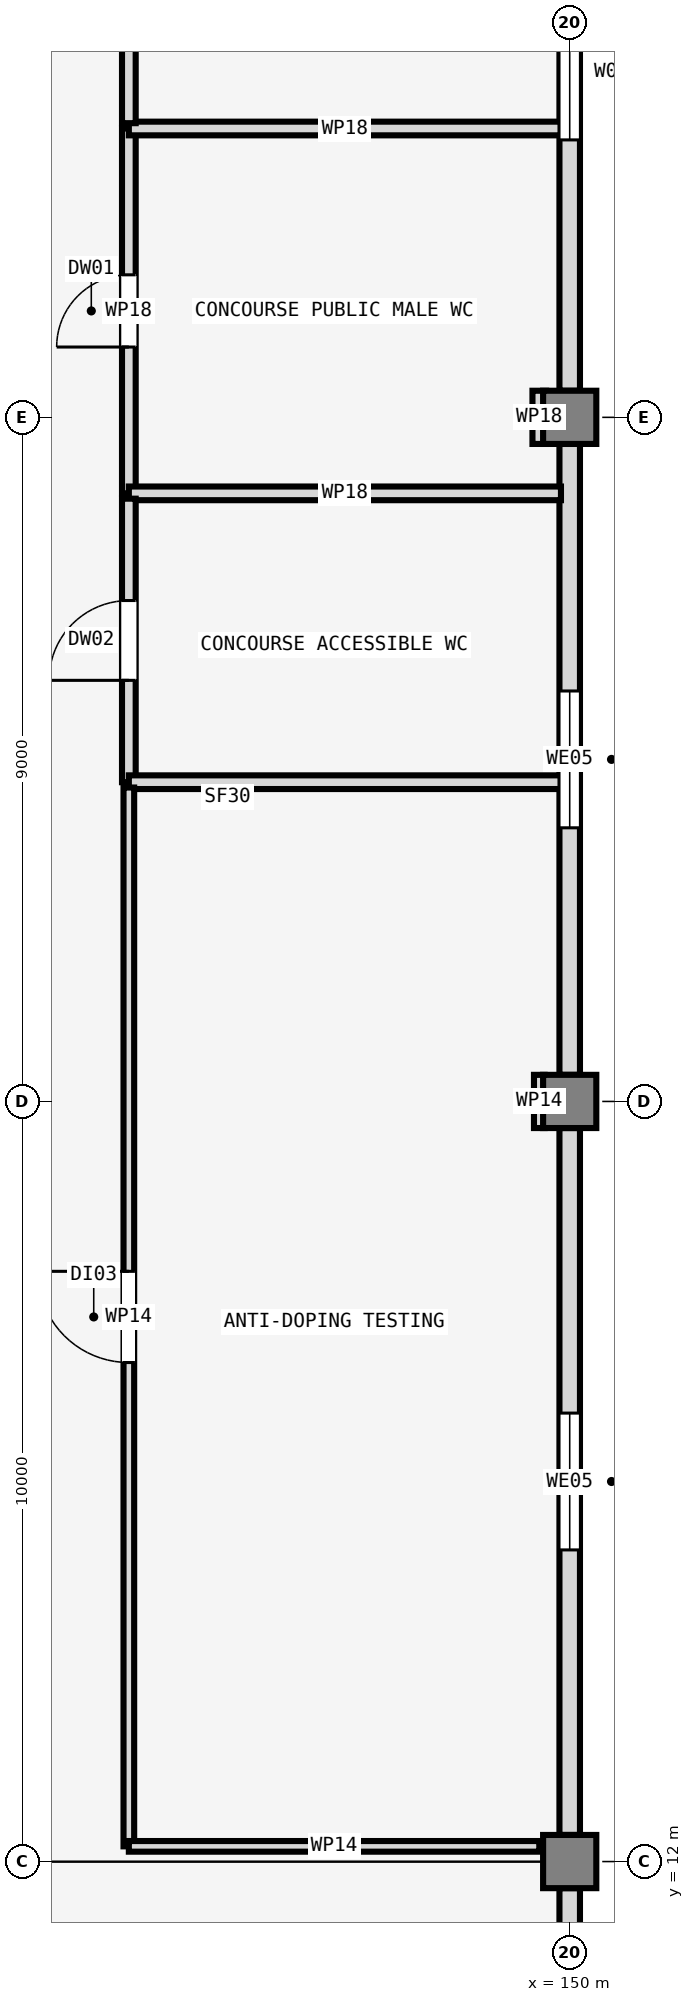
"""IFC4 building model, lengths in metres.
Left out: names, types, materials, properties, quantities, classifications, styles, units other than length and angle.
Written with IfcOpenShell. Run it as: python <this file> out.ifc"""

import sys

from ifc_helpers import new_model, si_unit, direction, frame, frame_2d, origin, origin_2d, place, context, subcontext, project, spatial, rectangle, extrude, element, fill, save


model = new_model("IFC4")
c1 = context("Model", 3, precision=1e-05, world=origin(), true_north=direction((0.0, 1.0)))
c2 = subcontext(c1, "Body", "Model", "MODEL_VIEW")
j1 = project(units=[si_unit("LENGTHUNIT", "METRE"), si_unit("PLANEANGLEUNIT", "RADIAN")], contexts=[c1])
p1 = place(None, origin())
s1 = spatial("IfcSite", under=j1, at=p1, CompositionType="ELEMENT")
p2 = place(p1, origin())
s2 = spatial("IfcBuilding", under=s1, at=p2, CompositionType="ELEMENT")
p3 = place(p2, origin())
s3 = spatial("IfcBuildingStorey", under=s2, at=p3, CompositionType="ELEMENT", Elevation=0.0)
for number, where, z_axis, x_axis in (
    (1, (150.0, 12.0, 0.0), (0.0, 0.0, 1.0), (1.0, 0.0, 0.0)),
    (2, (150.0, 22.0, 0.0), (0.0, 0.0, 1.0), (1.0, 0.0, 0.0)),
    (3, (150.0, 31.0, 0.0), (0.0, 0.0, 1.0), (1.0, 0.0, 0.0)),
):
    element("IfcColumn", number, at=place(p3, frame(where, z_axis=z_axis, x_axis=x_axis)), inside=s3, PredefinedType="COLUMN", context=c2, shape_type="SweptSolid", body=[
        extrude(rectangle(XDim=0.7, YDim=0.7, at=origin_2d()), origin(), (0.0, 0.0, 1.0), 4.8),
    ])
p4 = place(p3, frame((150.0, 6.35, 0.0), z_axis=(0.0, 0.0, 1.0), x_axis=(0.0, 1.0, 0.0)))
e4 = element("IfcWall", 4, at=p4, inside=s3, PredefinedType="SOLIDWALL", context=c2, shape_type="SweptSolid", body=[
    extrude(rectangle(XDim=5.3, YDim=0.27, at=frame_2d((2.65, 0.0))), origin(), (0.0, 0.0, 1.0), 3.73),
])
p5 = place(p4, frame((2.0, 0.0, 1.95)))
e5 = element("IfcOpeningElement", 5, at=p5, cuts=e4, PredefinedType="OPENING", context=c2, shape_type="SweptSolid", body=[
    extrude(rectangle(XDim=1.3, YDim=0.85, at=frame_2d((0.65, 0.425))), frame((0.0, 0.145, 0.0), z_axis=(0.0, -1.0, 0.0), x_axis=(1.0, 0.0, 0.0)), (0.0, 0.0, 1.0), 0.29),
])
p6 = place(p3, frame((150.0, 12.35, 0.0), z_axis=(0.0, 0.0, 1.0), x_axis=(0.0, 1.0, 0.0)))
e6 = element("IfcWall", 6, at=p6, inside=s3, PredefinedType="SOLIDWALL", context=c2, shape_type="SweptSolid", body=[
    extrude(rectangle(XDim=9.3, YDim=0.27, at=frame_2d((4.65, 0.0))), origin(), (0.0, 0.0, 1.0), 3.73),
])
p7 = place(p6, frame((3.75, 0.0, 1.2)))
e7 = element("IfcOpeningElement", 7, at=p7, cuts=e6, PredefinedType="OPENING", context=c2, shape_type="SweptSolid", body=[
    extrude(rectangle(XDim=1.8, YDim=1.5, at=frame_2d((0.9, 0.75))), frame((0.0, 0.145, 0.0), z_axis=(0.0, -1.0, 0.0), x_axis=(1.0, 0.0, 0.0)), (0.0, 0.0, 1.0), 0.29),
])
p8 = place(p3, frame((150.0, 22.35, 0.0), z_axis=(0.0, 0.0, 1.0), x_axis=(0.0, 1.0, 0.0)))
e8 = element("IfcWall", 8, at=p8, inside=s3, PredefinedType="SOLIDWALL", context=c2, shape_type="SweptSolid", body=[
    extrude(rectangle(XDim=8.3, YDim=0.27, at=frame_2d((4.15, 0.0))), origin(), (0.0, 0.0, 1.0), 3.73),
])
p9 = place(p8, frame((3.25, 0.0, 1.2)))
e9 = element("IfcOpeningElement", 9, at=p9, cuts=e8, PredefinedType="OPENING", context=c2, shape_type="SweptSolid", body=[
    extrude(rectangle(XDim=1.8, YDim=1.5, at=frame_2d((0.9, 0.75))), frame((0.0, 0.145, 0.0), z_axis=(0.0, -1.0, 0.0), x_axis=(1.0, 0.0, 0.0)), (0.0, 0.0, 1.0), 0.29),
])
p10 = place(p3, frame((150.0, 31.35, 0.0), z_axis=(0.0, 0.0, 1.0), x_axis=(0.0, 1.0, 0.0)))
e10 = element("IfcWall", 10, at=p10, inside=s3, PredefinedType="SOLIDWALL", context=c2, shape_type="SweptSolid", body=[
    extrude(rectangle(XDim=8.4, YDim=0.27, at=frame_2d((4.2, 0.0))), origin(), (0.0, 0.0, 1.0), 3.73),
])
p11 = place(p10, frame((3.3, 0.0, 1.2)))
e11 = element("IfcOpeningElement", 11, at=p11, cuts=e10, PredefinedType="OPENING", context=c2, shape_type="SweptSolid", body=[
    extrude(rectangle(XDim=1.8, YDim=1.5, at=frame_2d((0.9, 0.75))), frame((0.0, 0.145, 0.0), z_axis=(0.0, -1.0, 0.0), x_axis=(1.0, 0.0, 0.0)), (0.0, 0.0, 1.0), 0.29),
])
p12 = place(p3, frame((144.2, 30.0, 0.0), z_axis=(0.0, 0.0, 1.0), x_axis=(0.0, 1.0, 0.0)))
e12 = element("IfcWall", 12, at=p12, inside=s3, PredefinedType="PARTITIONING", context=c2, shape_type="SweptSolid", body=[
    extrude(rectangle(XDim=4.8, YDim=0.18, at=frame_2d((2.4, 0.0))), origin(), (0.0, 0.0, 1.0), 3.68),
])
p13 = place(p12, frame((1.925, 0.0, 0.0)))
e13 = element("IfcOpeningElement", 13, at=p13, cuts=e12, PredefinedType="OPENING", context=c2, shape_type="SweptSolid", body=[
    extrude(rectangle(XDim=0.95, YDim=2.1, at=frame_2d((0.475, 1.05))), frame((0.0, 0.1, 0.0), z_axis=(0.0, -1.0, 0.0), x_axis=(1.0, 0.0, 0.0)), (0.0, 0.0, 1.0), 0.2),
])
for number, where, z_axis, x_axis in (
    (14, (144.2, 34.8, 0.0), (0.0, 0.0, 1.0), (1.0, 0.0, 0.0)),
    (15, (149.885, 30.0, 0.0), (0.0, 0.0, 1.0), (-1.0, 0.0, 0.0)),
):
    element("IfcWall", number, at=place(p3, frame(where, z_axis=z_axis, x_axis=x_axis)), inside=s3, PredefinedType="PARTITIONING", context=c2, shape_type="SweptSolid", body=[
        extrude(rectangle(XDim=5.685, YDim=0.18, at=frame_2d((2.843, 0.0))), origin(), (0.0, 0.0, 1.0), 3.68),
    ])
p14 = place(p3, frame((149.6, 31.35, 0.0), z_axis=(0.0, 0.0, 1.0), x_axis=(0.0, -1.0, 0.0)))
e16 = element("IfcWall", 16, at=p14, inside=s3, PredefinedType="PARTITIONING", context=c2, shape_type="SweptSolid", body=[
    extrude(rectangle(XDim=0.7, YDim=0.18, at=frame_2d((0.35, 0.0))), origin(), (0.0, 0.0, 1.0), 3.68),
])
p15 = place(p3, frame((144.2, 34.87, 0.0), z_axis=(0.0, 0.0, 1.0), x_axis=(0.0, 1.0, 0.0)))
e17 = element("IfcWall", 17, at=p15, inside=s3, PredefinedType="PARTITIONING", context=c2, shape_type="SweptSolid", body=[
    extrude(rectangle(XDim=5.059, YDim=0.18, at=frame_2d((2.529, 0.0))), origin(), (0.0, 0.0, 1.0), 3.68),
])
p16 = place(p15, frame((2.054, 0.0, 0.0)))
e18 = element("IfcOpeningElement", 18, at=p16, cuts=e17, PredefinedType="OPENING", context=c2, shape_type="SweptSolid", body=[
    extrude(rectangle(XDim=0.95, YDim=2.1, at=frame_2d((0.475, 1.05))), frame((0.0, 0.1, 0.0), z_axis=(0.0, -1.0, 0.0), x_axis=(1.0, 0.0, 0.0)), (0.0, 0.0, 1.0), 0.2),
])
p17 = place(p3, frame((144.2, 26.2, 0.0), z_axis=(0.0, 0.0, 1.0), x_axis=(0.0, 1.0, 0.0)))
e19 = element("IfcWall", 19, at=p17, inside=s3, PredefinedType="PARTITIONING", context=c2, shape_type="SweptSolid", body=[
    extrude(rectangle(XDim=3.73, YDim=0.18, at=frame_2d((1.865, 0.0))), origin(), (0.0, 0.0, 1.0), 3.68),
])
p18 = place(p17, frame((1.34, 0.0, 0.0)))
e20 = element("IfcOpeningElement", 20, at=p18, cuts=e19, PredefinedType="OPENING", context=c2, shape_type="SweptSolid", body=[
    extrude(rectangle(XDim=1.05, YDim=2.1, at=frame_2d((0.525, 1.05))), frame((0.0, 0.1, 0.0), z_axis=(0.0, -1.0, 0.0), x_axis=(1.0, 0.0, 0.0)), (0.0, 0.0, 1.0), 0.2),
])
p19 = place(p3, frame((149.885, 26.2, 0.0), z_axis=(0.0, 0.0, 1.0), x_axis=(-1.0, 0.0, 0.0)))
e21 = element("IfcWall", 21, at=p19, inside=s3, PredefinedType="PARTITIONING", context=c2, shape_type="SweptSolid", body=[
    extrude(rectangle(XDim=5.685, YDim=0.18, at=frame_2d((2.843, 0.0))), origin(), (0.0, 0.0, 1.0), 3.68),
])
p20 = place(p3, frame((144.2, 12.2, 0.0), z_axis=(0.0, 0.0, 1.0), x_axis=(0.0, 1.0, 0.0)))
e22 = element("IfcWall", 22, at=p20, inside=s3, PredefinedType="PARTITIONING", context=c2, shape_type="SweptSolid", body=[
    extrude(rectangle(XDim=13.93, YDim=0.14, at=frame_2d((6.965, 0.0))), origin(), (0.0, 0.0, 1.0), 3.68),
])
p21 = place(p20, frame((6.365, 0.0, 0.0)))
e23 = element("IfcOpeningElement", 23, at=p21, cuts=e22, PredefinedType="OPENING", context=c2, shape_type="SweptSolid", body=[
    extrude(rectangle(XDim=1.2, YDim=2.15, at=frame_2d((0.6, 1.075))), frame((0.0, 0.08, 0.0), z_axis=(0.0, -1.0, 0.0), x_axis=(1.0, 0.0, 0.0)), (0.0, 0.0, 1.0), 0.16),
])
p22 = place(p3, frame((149.6, 12.2, 0.0), z_axis=(0.0, 0.0, 1.0), x_axis=(-1.0, 0.0, 0.0)))
e24 = element("IfcWall", 24, at=p22, inside=s3, PredefinedType="PARTITIONING", context=c2, shape_type="SweptSolid", body=[
    extrude(rectangle(XDim=5.4, YDim=0.14, at=frame_2d((2.7, 0.0))), origin(), (0.0, 0.0, 1.0), 3.68),
])
p23 = place(p3, frame((149.6, 22.35, 0.0), z_axis=(0.0, 0.0, 1.0), x_axis=(0.0, -1.0, 0.0)))
e25 = element("IfcWall", 25, at=p23, inside=s3, PredefinedType="PARTITIONING", context=c2, shape_type="SweptSolid", body=[
    extrude(rectangle(XDim=0.7, YDim=0.14, at=frame_2d((0.35, 0.0))), origin(), (0.0, 0.0, 1.0), 3.68),
])
p24 = place(p7, origin())
e26 = element("IfcWindow", 26, at=p24, inside=s3, PartitioningType="SINGLE_PANEL", PredefinedType="WINDOW", context=c2, shape_type="SweptSolid", body=[
    extrude(rectangle(XDim=1.8, YDim=1.5, at=frame_2d((0.9, 0.75))), frame((0.0, 0.03, 0.0), z_axis=(0.0, -1.0, 0.0), x_axis=(1.0, 0.0, 0.0)), (0.0, 0.0, 1.0), 0.06),
])
fill(e7, e26)
p25 = place(p9, origin())
e27 = element("IfcWindow", 27, at=p25, inside=s3, PartitioningType="SINGLE_PANEL", PredefinedType="WINDOW", context=c2, shape_type="SweptSolid", body=[
    extrude(rectangle(XDim=1.8, YDim=1.5, at=frame_2d((0.9, 0.75))), frame((0.0, 0.03, 0.0), z_axis=(0.0, -1.0, 0.0), x_axis=(1.0, 0.0, 0.0)), (0.0, 0.0, 1.0), 0.06),
])
fill(e9, e27)
p26 = place(p11, origin())
e28 = element("IfcWindow", 28, at=p26, inside=s3, PartitioningType="SINGLE_PANEL", PredefinedType="WINDOW", context=c2, shape_type="SweptSolid", body=[
    extrude(rectangle(XDim=1.8, YDim=1.5, at=frame_2d((0.9, 0.75))), frame((0.0, 0.03, 0.0), z_axis=(0.0, -1.0, 0.0), x_axis=(1.0, 0.0, 0.0)), (0.0, 0.0, 1.0), 0.06),
])
fill(e11, e28)
p27 = place(p13, origin())
e29 = element("IfcDoor", 29, at=p27, inside=s3, OperationType="SINGLE_SWING_LEFT", PredefinedType="DOOR", context=c2, shape_type="SweptSolid", body=[
    extrude(rectangle(XDim=0.95, YDim=2.1, at=frame_2d((0.475, 1.05))), frame((0.0, 0.025, 0.0), z_axis=(0.0, -1.0, 0.0), x_axis=(1.0, 0.0, 0.0)), (0.0, 0.0, 1.0), 0.05),
])
fill(e13, e29)
p28 = place(p18, origin())
e30 = element("IfcDoor", 30, at=p28, inside=s3, OperationType="SINGLE_SWING_LEFT", PredefinedType="DOOR", context=c2, shape_type="SweptSolid", body=[
    extrude(rectangle(XDim=1.05, YDim=2.1, at=frame_2d((0.525, 1.05))), frame((0.0, 0.025, 0.0), z_axis=(0.0, -1.0, 0.0), x_axis=(1.0, 0.0, 0.0)), (0.0, 0.0, 1.0), 0.05),
])
fill(e20, e30)
p29 = place(p21, origin())
e31 = element("IfcDoor", 31, at=p29, inside=s3, OperationType="SINGLE_SWING_RIGHT", PredefinedType="DOOR", context=c2, shape_type="SweptSolid", body=[
    extrude(rectangle(XDim=1.2, YDim=2.15, at=frame_2d((0.6, 1.075))), frame((0.0, 0.025, 0.0), z_axis=(0.0, -1.0, 0.0), x_axis=(1.0, 0.0, 0.0)), (0.0, 0.0, 1.0), 0.05),
])
fill(e23, e31)
save(model, sys.argv[1])
